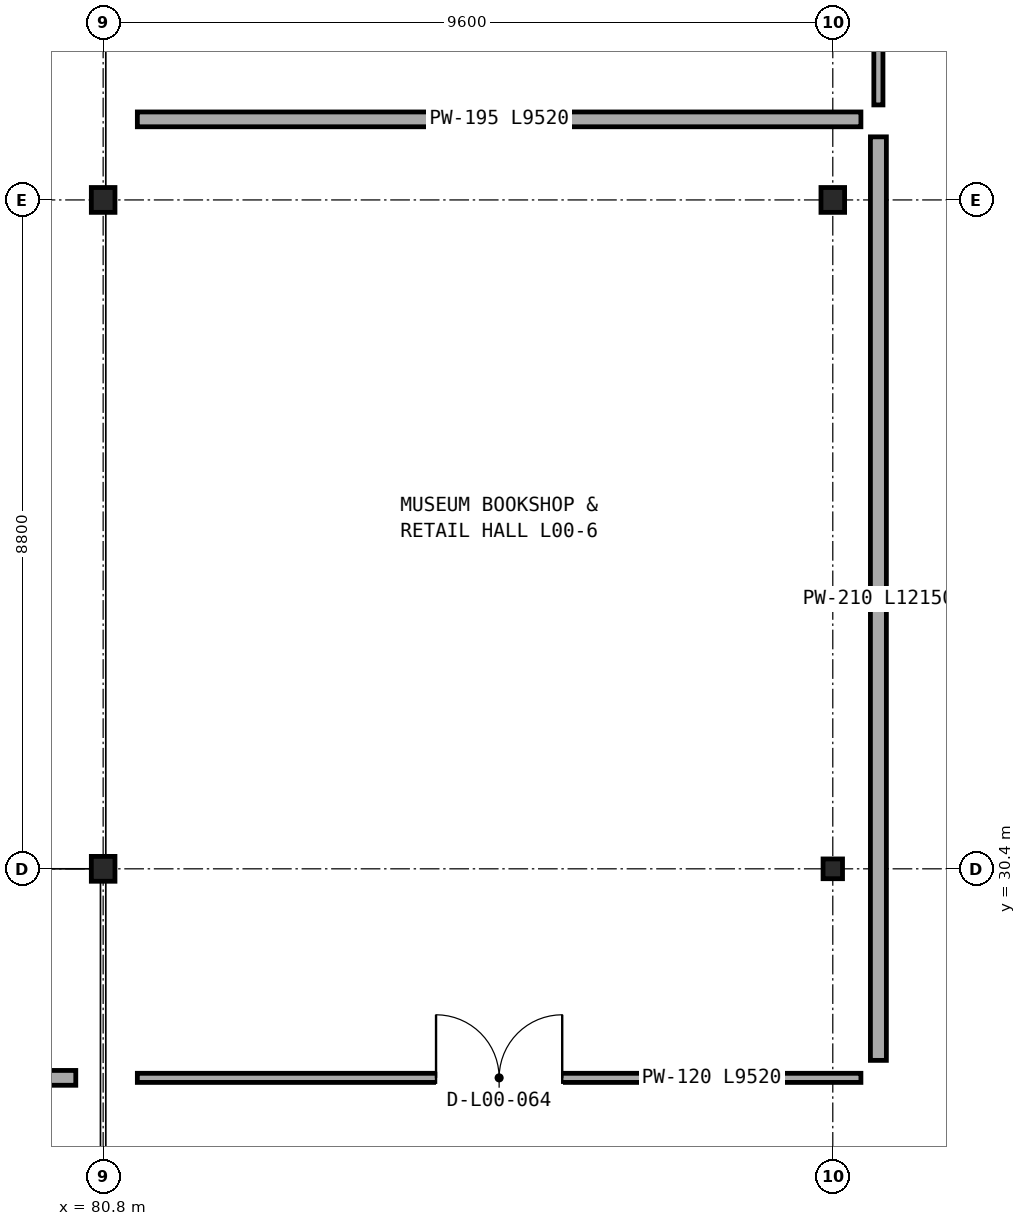
"""IFC4 building model, lengths in metres.
Left out: names, types, materials, properties, quantities, classifications, styles, units other than length and angle.
Written with IfcOpenShell. Run it as: python <this file> out.ifc"""

import sys

from ifc_helpers import new_model, si_unit, direction, frame, frame_2d, origin, origin_2d, place, context, subcontext, project, spatial, rectangle, i_section, extrude, element, fill, save


model = new_model("IFC4")
c1 = context("Model", 3, precision=1e-05, world=origin(), true_north=direction((0.0, 1.0)))
c2 = subcontext(c1, "Body", "Model", "MODEL_VIEW")
j1 = project(units=[si_unit("LENGTHUNIT", "METRE"), si_unit("PLANEANGLEUNIT", "RADIAN")], contexts=[c1])
p1 = place(None, origin())
s1 = spatial("IfcSite", under=j1, at=p1, CompositionType="ELEMENT")
p2 = place(p1, origin())
s2 = spatial("IfcBuilding", under=s1, at=p2, CompositionType="ELEMENT")
p3 = place(p2, origin())
s3 = spatial("IfcBuildingStorey", under=s2, at=p3, CompositionType="ELEMENT", Elevation=0.0)
p4 = place(p3, frame((90.4, 30.4, 0.0), z_axis=(0.0, 0.0, 1.0), x_axis=(1.0, 0.0, 0.0)))
e1 = element("IfcColumn", 1, at=p4, inside=s3, PredefinedType="COLUMN", context=c2, shape_type="SweptSolid", body=[
    extrude(i_section(OverallWidth=0.256, OverallDepth=0.26, WebThickness=0.01, FlangeThickness=0.017, FilletRadius=0.013, at=origin_2d()), origin(), (0.0, 0.0, 1.0), 5.6),
])
for number, where, z_axis, x_axis in (
    (2, (90.4, 39.2, 0.0), (0.0, 0.0, 1.0), (1.0, 0.0, 0.0)),
    (3, (80.8, 30.4, 0.0), (0.0, 0.0, 1.0), (1.0, 0.0, 0.0)),
    (4, (80.8, 39.2, 0.0), (0.0, 0.0, 1.0), (1.0, 0.0, 0.0)),
):
    element("IfcColumn", number, at=place(p3, frame(where, z_axis=z_axis, x_axis=x_axis)), inside=s3, PredefinedType="COLUMN", context=c2, shape_type="SweptSolid", body=[
        extrude(i_section(OverallWidth=0.311, OverallDepth=0.327, WebThickness=0.016, FlangeThickness=0.025, FilletRadius=0.017, at=origin_2d()), origin(), (0.0, 0.0, 1.0), 5.6),
    ])
p5 = place(p3, frame((90.77, 27.65, 0.0), z_axis=(0.0, 0.0, 1.0), x_axis=(-1.0, 0.0, 0.0)))
e5 = element("IfcWall", 5, at=p5, inside=s3, PredefinedType="PARTITIONING", context=c2, shape_type="SweptSolid", body=[
    extrude(rectangle(XDim=9.52, YDim=0.12, at=frame_2d((4.76, 0.0))), origin(), (0.0, 0.0, 1.0), 4.787),
])
p6 = place(p5, frame((3.93, 0.0, 0.0)))
e6 = element("IfcOpeningElement", 6, at=p6, cuts=e5, PredefinedType="OPENING", context=c2, shape_type="SweptSolid", body=[
    extrude(rectangle(XDim=1.66, YDim=2.34, at=frame_2d((0.83, 1.17))), frame((0.0, 0.07, 0.0), z_axis=(0.0, -1.0, 0.0), x_axis=(1.0, 0.0, 0.0)), (0.0, 0.0, 1.0), 0.14),
])
p7 = place(p3, frame((91.0, 40.03, 0.0), z_axis=(0.0, 0.0, 1.0), x_axis=(0.0, -1.0, 0.0)))
e7 = element("IfcWall", 7, at=p7, inside=s3, PredefinedType="PARTITIONING", context=c2, shape_type="SweptSolid", body=[
    extrude(rectangle(XDim=12.15, YDim=0.21, at=frame_2d((6.075, 0.0))), origin(), (0.0, 0.0, 1.0), 4.708),
])
p8 = place(p3, frame((91.0, 50.92, 0.0), z_axis=(0.0, 0.0, 1.0), x_axis=(0.0, -1.0, 0.0)))
e8 = element("IfcWall", 8, at=p8, inside=s3, PredefinedType="PARTITIONING", context=c2, shape_type="SweptSolid", body=[
    extrude(rectangle(XDim=10.47, YDim=0.12, at=frame_2d((5.235, 0.0))), origin(), (0.0, 0.0, 1.0), 4.708),
])
p9 = place(p3, frame((80.44, 27.65, 0.0), z_axis=(0.0, 0.0, 1.0), x_axis=(-1.0, 0.0, 0.0)))
e9 = element("IfcWall", 9, at=p9, inside=s3, PredefinedType="PARTITIONING", context=c2, shape_type="SweptSolid", body=[
    extrude(rectangle(XDim=2.04, YDim=0.195, at=frame_2d((1.02, 0.0))), origin(), (0.0, 0.0, 1.0), 5.23),
])
p10 = place(p9, frame((0.495, 0.0, 0.0)))
e10 = element("IfcOpeningElement", 10, at=p10, cuts=e9, PredefinedType="OPENING", context=c2, shape_type="SweptSolid", body=[
    extrude(rectangle(XDim=1.05, YDim=2.15, at=frame_2d((0.525, 1.075))), frame((0.0, 0.107, 0.0), z_axis=(0.0, -1.0, 0.0), x_axis=(1.0, 0.0, 0.0)), (0.0, 0.0, 1.0), 0.215),
])
p11 = place(p3, frame((81.25, 40.26, 0.0), z_axis=(0.0, 0.0, 1.0), x_axis=(1.0, 0.0, 0.0)))
e11 = element("IfcWall", 11, at=p11, inside=s3, PredefinedType="PARTITIONING", context=c2, shape_type="SweptSolid", body=[
    extrude(rectangle(XDim=9.52, YDim=0.195, at=frame_2d((4.76, 0.0))), origin(), (0.0, 0.0, 1.0), 4.787),
])
p12 = place(p6, frame((1.66, 0.0, 0.0), z_axis=(0.0, 0.0, 1.0), x_axis=(-1.0, 0.0, 0.0)))
e12 = element("IfcDoor", 12, at=p12, inside=s3, OperationType="DOUBLE_DOOR_SINGLE_SWING", PredefinedType="DOOR", context=c2, shape_type="SweptSolid", body=[
    extrude(rectangle(XDim=1.66, YDim=2.34, at=frame_2d((0.83, 1.17))), frame((0.0, 0.025, 0.0), z_axis=(0.0, -1.0, 0.0), x_axis=(1.0, 0.0, 0.0)), (0.0, 0.0, 1.0), 0.05),
])
fill(e6, e12)
save(model, sys.argv[1])
